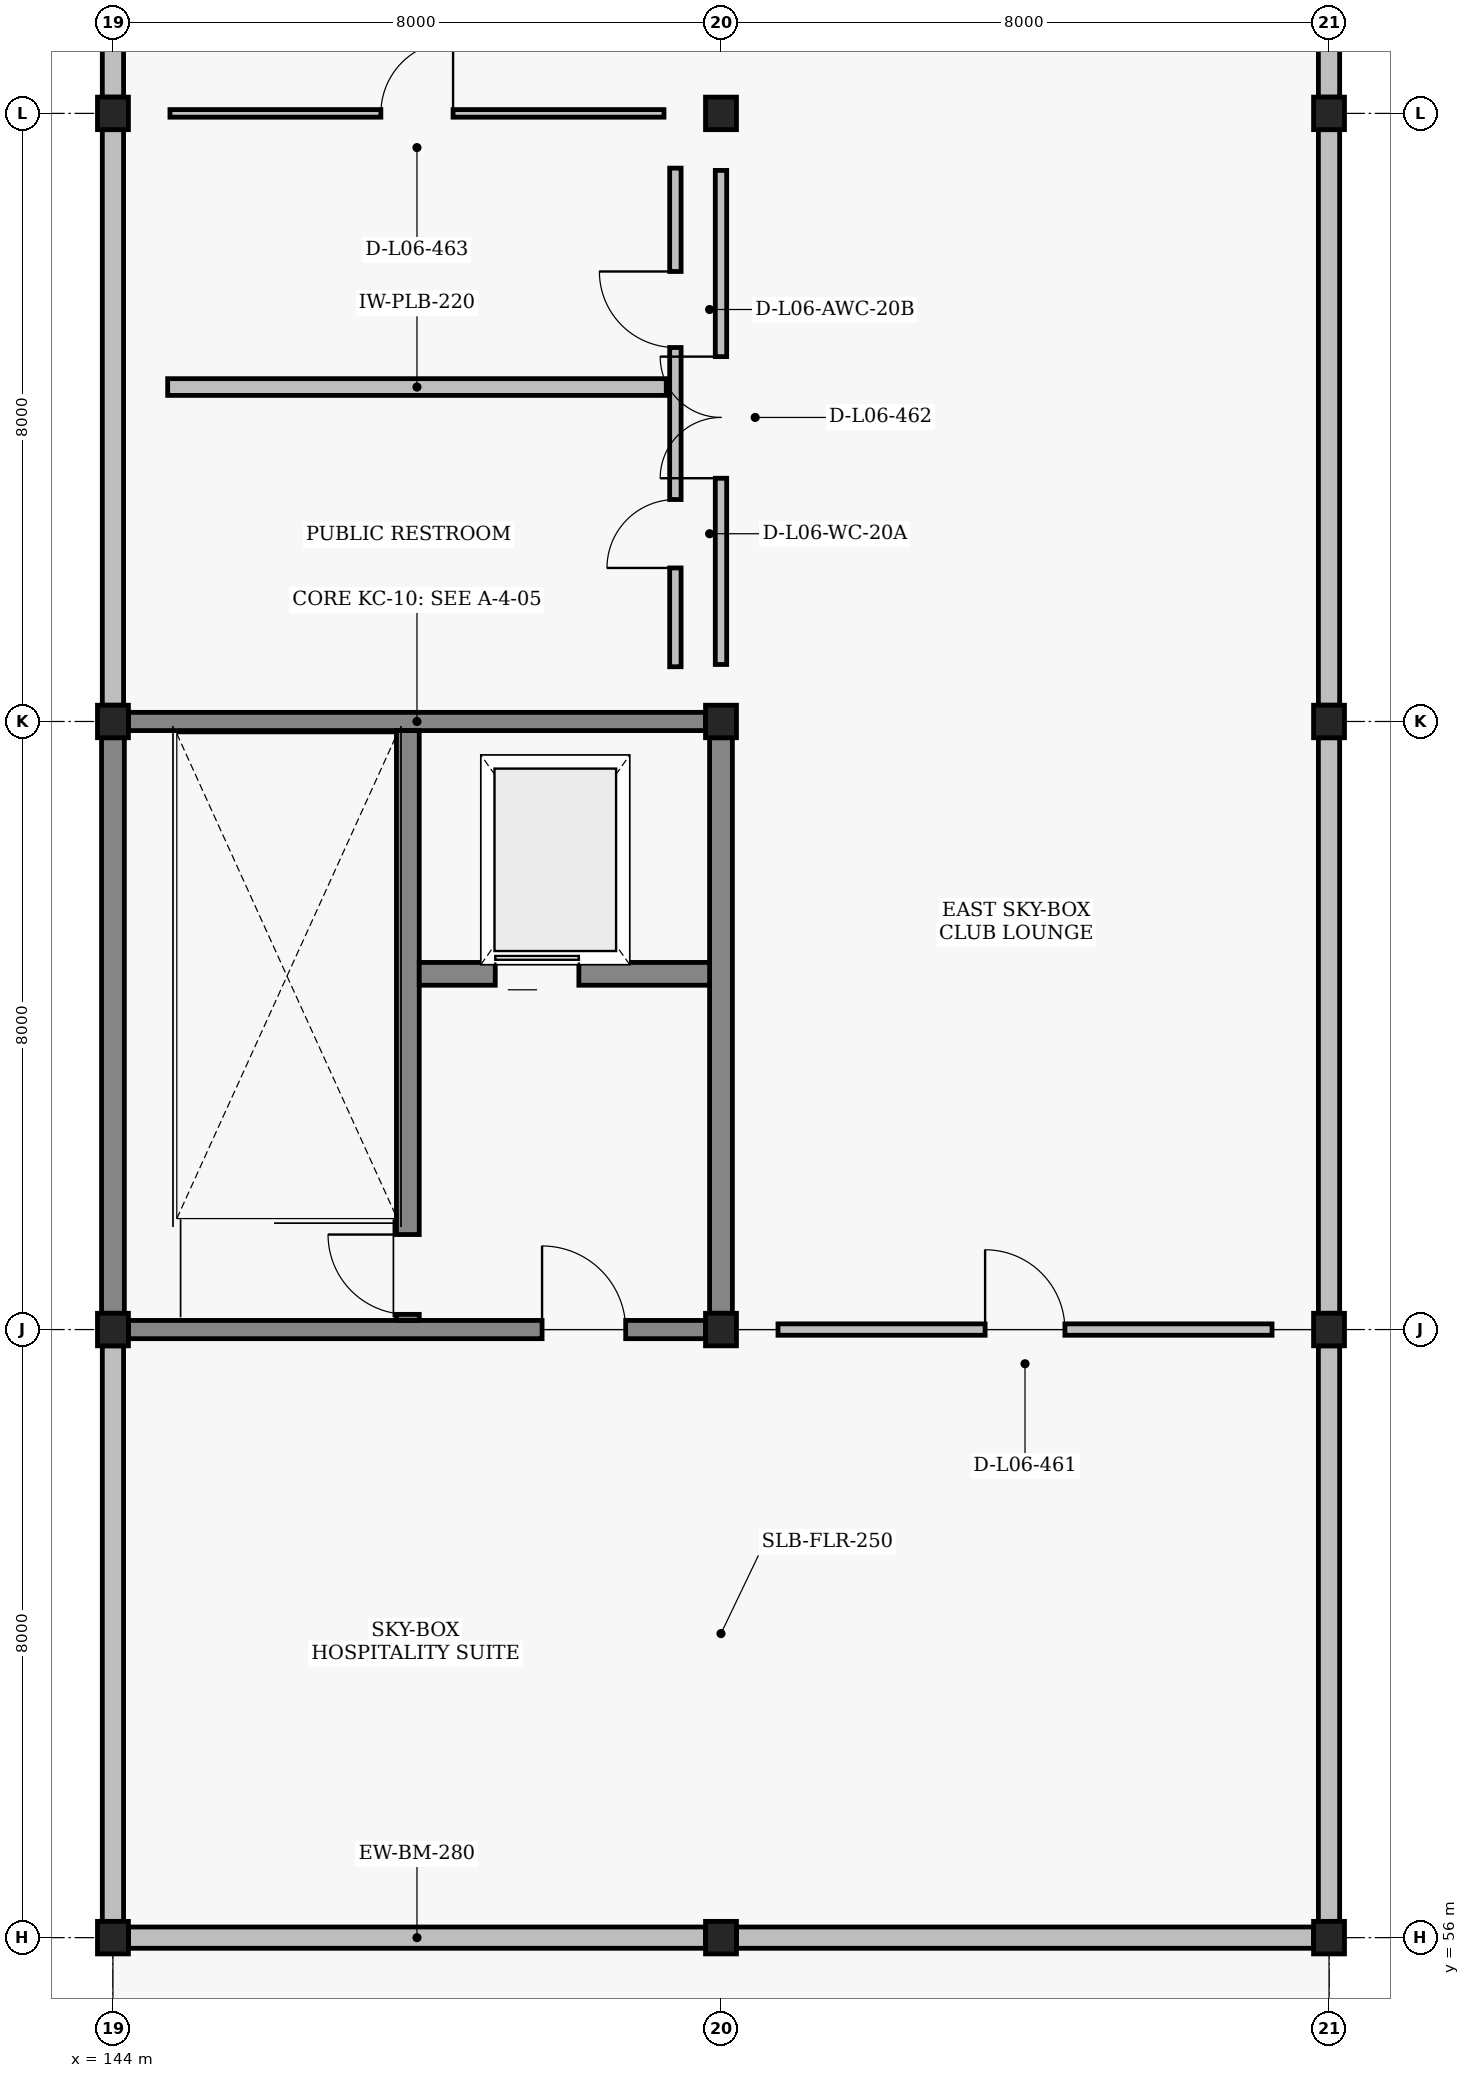
"""IFC4 building model, lengths in metres.
Left out: names, types, materials, properties, quantities, classifications, styles, units other than length and angle.
Written with IfcOpenShell. Run it as: python <this file> out.ifc"""

import sys

from ifc_helpers import new_model, si_unit, direction, frame, frame_2d, origin, origin_2d, place, context, subcontext, project, spatial, rectangle, i_section, extrude, element, fill, save


model = new_model("IFC4")
c1 = context("Model", 3, precision=1e-05, world=origin(), true_north=direction((0.0, 1.0)))
c2 = subcontext(c1, "Body", "Model", "MODEL_VIEW")
j1 = project(units=[si_unit("LENGTHUNIT", "METRE"), si_unit("PLANEANGLEUNIT", "RADIAN")], contexts=[c1])
p1 = place(None, origin())
s1 = spatial("IfcSite", under=j1, at=p1, CompositionType="ELEMENT")
p2 = place(p1, origin())
s2 = spatial("IfcBuilding", under=s1, at=p2, CompositionType="ELEMENT")
p3 = place(p2, frame((0.0, 0.0, 22.8)))
s3 = spatial("IfcBuildingStorey", under=s2, at=p3, CompositionType="ELEMENT", Elevation=22.8)
for number, where, z_axis, x_axis in (
    (1, (144.0, 56.0, 0.0), (0.0, 0.0, 1.0), (1.0, 0.0, 0.0)),
    (2, (144.0, 64.0, 0.0), (0.0, 0.0, 1.0), (1.0, 0.0, 0.0)),
    (3, (144.0, 72.0, 0.0), (0.0, 0.0, 1.0), (1.0, 0.0, 0.0)),
    (4, (144.0, 80.0, 0.0), (0.0, 0.0, 1.0), (1.0, 0.0, 0.0)),
    (5, (152.0, 56.0, 0.0), (0.0, 0.0, 1.0), (1.0, 0.0, 0.0)),
    (6, (152.0, 64.0, 0.0), (0.0, 0.0, 1.0), (1.0, 0.0, 0.0)),
    (7, (152.0, 72.0, 0.0), (0.0, 0.0, 1.0), (1.0, 0.0, 0.0)),
    (8, (152.0, 80.0, 0.0), (0.0, 0.0, 1.0), (1.0, 0.0, 0.0)),
    (9, (160.0, 56.0, 0.0), (0.0, 0.0, 1.0), (1.0, 0.0, 0.0)),
    (10, (160.0, 64.0, 0.0), (0.0, 0.0, 1.0), (1.0, 0.0, 0.0)),
    (11, (160.0, 72.0, 0.0), (0.0, 0.0, 1.0), (1.0, 0.0, 0.0)),
    (12, (160.0, 80.0, 0.0), (0.0, 0.0, 1.0), (1.0, 0.0, 0.0)),
):
    element("IfcColumn", number, at=place(p3, frame(where, z_axis=z_axis, x_axis=x_axis)), inside=s3, PredefinedType="COLUMN", context=c2, shape_type="SweptSolid", body=[
        extrude(i_section(OverallWidth=0.407, OverallDepth=0.428, WebThickness=0.02, FlangeThickness=0.035, at=origin_2d()), origin(), (0.0, 0.0, 1.0), 4.2),
    ])
p4 = place(p3, frame((144.204, 56.0, 0.0), z_axis=(0.0, 0.0, 1.0), x_axis=(1.0, 0.0, 0.0)))
e13 = element("IfcWall", 13, at=p4, inside=s3, PredefinedType="SOLIDWALL", context=c2, shape_type="SweptSolid", body=[
    extrude(rectangle(XDim=7.592, YDim=0.28, at=frame_2d((3.796, 0.0))), origin(), (0.0, 0.0, 1.0), 3.35),
])
for number, where, z_axis, x_axis in (
    (14, (144.0, 56.214, 0.0), (0.0, 0.0, 1.0), (0.0, 1.0, 0.0)),
    (15, (144.0, 72.214, 0.0), (0.0, 0.0, 1.0), (0.0, 1.0, 0.0)),
    (16, (144.0, 80.214, 0.0), (0.0, 0.0, 1.0), (0.0, 1.0, 0.0)),
):
    element("IfcWall", number, at=place(p3, frame(where, z_axis=z_axis, x_axis=x_axis)), inside=s3, PredefinedType="SOLIDWALL", context=c2, shape_type="SweptSolid", body=[
        extrude(rectangle(XDim=7.572, YDim=0.28, at=frame_2d((3.786, 0.0))), origin(), (0.0, 0.0, 1.0), 3.35),
    ])
p5 = place(p3, frame((152.204, 56.0, 0.0), z_axis=(0.0, 0.0, 1.0), x_axis=(1.0, 0.0, 0.0)))
e17 = element("IfcWall", 17, at=p5, inside=s3, PredefinedType="SOLIDWALL", context=c2, shape_type="SweptSolid", body=[
    extrude(rectangle(XDim=7.592, YDim=0.28, at=frame_2d((3.796, 0.0))), origin(), (0.0, 0.0, 1.0), 3.35),
])
for number, where, z_axis, x_axis in (
    (18, (160.0, 56.214, 0.0), (0.0, 0.0, 1.0), (0.0, 1.0, 0.0)),
    (19, (160.0, 64.214, 0.0), (0.0, 0.0, 1.0), (0.0, 1.0, 0.0)),
    (20, (160.0, 72.214, 0.0), (0.0, 0.0, 1.0), (0.0, 1.0, 0.0)),
    (21, (160.0, 80.214, 0.0), (0.0, 0.0, 1.0), (0.0, 1.0, 0.0)),
):
    element("IfcWall", number, at=place(p3, frame(where, z_axis=z_axis, x_axis=x_axis)), inside=s3, PredefinedType="SOLIDWALL", context=c2, shape_type="SweptSolid", body=[
        extrude(rectangle(XDim=7.572, YDim=0.28, at=frame_2d((3.786, 0.0))), origin(), (0.0, 0.0, 1.0), 3.35),
    ])
p6 = place(p3, frame((144.204, 64.0, 0.0), z_axis=(0.0, 0.0, 1.0), x_axis=(1.0, 0.0, 0.0)))
e22 = element("IfcWall", 22, at=p6, inside=s3, PredefinedType="SHEAR", context=c2, shape_type="SweptSolid", body=[
    extrude(rectangle(XDim=7.592, YDim=0.24, at=frame_2d((3.796, 0.0))), origin(), (0.0, 0.0, 1.0), 3.37),
])
p7 = place(p6, frame((5.442, 0.0, 0.0)))
e23 = element("IfcOpeningElement", 23, at=p7, cuts=e22, PredefinedType="OPENING", context=c2, shape_type="SweptSolid", body=[
    extrude(rectangle(XDim=1.1, YDim=2.2, at=frame_2d((0.55, 1.1))), frame((0.0, 0.13, 0.0), z_axis=(0.0, -1.0, 0.0), x_axis=(1.0, 0.0, 0.0)), (0.0, 0.0, 1.0), 0.26),
])
p8 = place(p3, frame((144.204, 72.0, 0.0), z_axis=(0.0, 0.0, 1.0), x_axis=(1.0, 0.0, 0.0)))
e24 = element("IfcWall", 24, at=p8, inside=s3, PredefinedType="SHEAR", context=c2, shape_type="SweptSolid", body=[
    extrude(rectangle(XDim=7.592, YDim=0.24, at=frame_2d((3.796, 0.0))), origin(), (0.0, 0.0, 1.0), 3.37),
])
for number, where, z_axis, x_axis in (
    (25, (144.0, 64.214, 0.0), (0.0, 0.0, 1.0), (0.0, 1.0, 0.0)),
    (26, (152.0, 64.214, 0.0), (0.0, 0.0, 1.0), (0.0, 1.0, 0.0)),
):
    element("IfcWall", number, at=place(p3, frame(where, z_axis=z_axis, x_axis=x_axis)), inside=s3, PredefinedType="SHEAR", context=c2, shape_type="SweptSolid", body=[
        extrude(rectangle(XDim=7.572, YDim=0.3, at=frame_2d((3.786, 0.0))), origin(), (0.0, 0.0, 1.0), 3.37),
    ])
p9 = place(p3, frame((147.88, 64.12, 0.0), z_axis=(0.0, 0.0, 1.0), x_axis=(0.0, 1.0, 0.0)))
e27 = element("IfcWall", 27, at=p9, inside=s3, PredefinedType="SHEAR", context=c2, shape_type="SweptSolid", body=[
    extrude(rectangle(XDim=7.76, YDim=0.3, at=frame_2d((3.88, 0.0))), origin(), (0.0, 0.0, 1.0), 3.47),
])
p10 = place(p9, frame((0.08, 0.0, 0.0)))
e28 = element("IfcOpeningElement", 28, at=p10, cuts=e27, PredefinedType="OPENING", context=c2, shape_type="SweptSolid", body=[
    extrude(rectangle(XDim=1.05, YDim=2.15, at=frame_2d((0.525, 1.075))), frame((0.0, 0.16, 0.0), z_axis=(0.0, -1.0, 0.0), x_axis=(1.0, 0.0, 0.0)), (0.0, 0.0, 1.0), 0.32),
])
p11 = place(p3, frame((148.03, 68.68, 0.0), z_axis=(0.0, 0.0, 1.0), x_axis=(1.0, 0.0, 0.0)))
e29 = element("IfcWall", 29, at=p11, inside=s3, PredefinedType="SHEAR", context=c2, shape_type="SweptSolid", body=[
    extrude(rectangle(XDim=3.82, YDim=0.3, at=frame_2d((1.91, 0.0))), origin(), (0.0, 0.0, 1.0), 3.37),
])
p12 = place(p11, frame((1.0, 0.0, 0.0)))
e30 = element("IfcOpeningElement", 30, at=p12, cuts=e29, PredefinedType="OPENING", context=c2, shape_type="SweptSolid", body=[
    extrude(rectangle(XDim=1.1, YDim=2.15, at=frame_2d((0.55, 1.075))), frame((0.0, 0.16, 0.0), z_axis=(0.0, -1.0, 0.0), x_axis=(1.0, 0.0, 0.0)), (0.0, 0.0, 1.0), 0.32),
])
p13 = place(p3, frame((144.72, 76.4, 0.0), z_axis=(0.0, 0.0, 1.0), x_axis=(1.0, 0.0, 0.0)))
e31 = element("IfcWall", 31, at=p13, inside=s3, PredefinedType="PLUMBINGWALL", context=c2, shape_type="SweptSolid", body=[
    extrude(rectangle(XDim=6.56, YDim=0.22, at=frame_2d((3.28, 0.0))), origin(), (0.0, 0.0, 1.0), 3.67),
])
p14 = place(p3, frame((151.4, 72.72, 0.0), z_axis=(0.0, 0.0, 1.0), x_axis=(0.0, 1.0, 0.0)))
e32 = element("IfcWall", 32, at=p14, inside=s3, PredefinedType="PARTITIONING", context=c2, shape_type="SweptSolid", body=[
    extrude(rectangle(XDim=6.56, YDim=0.15, at=frame_2d((3.28, 0.0))), origin(), (0.0, 0.0, 1.0), 3.67),
])
p15 = place(p14, frame((1.3, 0.0, 0.0)))
e33 = element("IfcOpeningElement", 33, at=p15, cuts=e32, PredefinedType="OPENING", context=c2, shape_type="SweptSolid", body=[
    extrude(rectangle(XDim=0.9, YDim=2.1, at=frame_2d((0.45, 1.05))), frame((0.0, 0.085, 0.0), z_axis=(0.0, -1.0, 0.0), x_axis=(1.0, 0.0, 0.0)), (0.0, 0.0, 1.0), 0.17),
])
p16 = place(p14, frame((4.2, 0.0, 0.0)))
e34 = element("IfcOpeningElement", 34, at=p16, cuts=e32, PredefinedType="OPENING", context=c2, shape_type="SweptSolid", body=[
    extrude(rectangle(XDim=1.0, YDim=2.15, at=frame_2d((0.5, 1.075))), frame((0.0, 0.085, 0.0), z_axis=(0.0, -1.0, 0.0), x_axis=(1.0, 0.0, 0.0)), (0.0, 0.0, 1.0), 0.17),
])
p17 = place(p3, frame((152.75, 64.0, 0.0), z_axis=(0.0, 0.0, 1.0), x_axis=(1.0, 0.0, 0.0)))
e35 = element("IfcWall", 35, at=p17, inside=s3, PredefinedType="PARTITIONING", context=c2, shape_type="SweptSolid", body=[
    extrude(rectangle(XDim=6.5, YDim=0.15, at=frame_2d((3.25, 0.0))), origin(), (0.0, 0.0, 1.0), 3.47),
])
p18 = place(p17, frame((2.725, 0.0, 0.0)))
e36 = element("IfcOpeningElement", 36, at=p18, cuts=e35, PredefinedType="OPENING", context=c2, shape_type="SweptSolid", body=[
    extrude(rectangle(XDim=1.05, YDim=2.15, at=frame_2d((0.525, 1.075))), frame((0.0, 0.085, 0.0), z_axis=(0.0, -1.0, 0.0), x_axis=(1.0, 0.0, 0.0)), (0.0, 0.0, 1.0), 0.17),
])
p19 = place(p3, frame((152.0, 72.75, 0.0), z_axis=(0.0, 0.0, 1.0), x_axis=(0.0, 1.0, 0.0)))
e37 = element("IfcWall", 37, at=p19, inside=s3, PredefinedType="PARTITIONING", context=c2, shape_type="SweptSolid", body=[
    extrude(rectangle(XDim=6.5, YDim=0.15, at=frame_2d((3.25, 0.0))), origin(), (0.0, 0.0, 1.0), 3.37),
])
p20 = place(p19, frame((2.45, 0.0, 0.0)))
e38 = element("IfcOpeningElement", 38, at=p20, cuts=e37, PredefinedType="OPENING", context=c2, shape_type="SweptSolid", body=[
    extrude(rectangle(XDim=1.6, YDim=2.2, at=frame_2d((0.8, 1.1))), frame((0.0, 0.085, 0.0), z_axis=(0.0, -1.0, 0.0), x_axis=(1.0, 0.0, 0.0)), (0.0, 0.0, 1.0), 0.17),
])
p21 = place(p3, frame((144.75, 80.0, 0.0), z_axis=(0.0, 0.0, 1.0), x_axis=(1.0, 0.0, 0.0)))
e39 = element("IfcWall", 39, at=p21, inside=s3, PredefinedType="PARTITIONING", context=c2, shape_type="SweptSolid", body=[
    extrude(rectangle(XDim=6.5, YDim=0.1, at=frame_2d((3.25, 0.0))), origin(), (0.0, 0.0, 1.0), 3.47),
])
p22 = place(p21, frame((2.775, 0.0, 0.0)))
e40 = element("IfcOpeningElement", 40, at=p22, cuts=e39, PredefinedType="OPENING", context=c2, shape_type="SweptSolid", body=[
    extrude(rectangle(XDim=0.95, YDim=2.1, at=frame_2d((0.475, 1.05))), frame((0.0, 0.06, 0.0), z_axis=(0.0, -1.0, 0.0), x_axis=(1.0, 0.0, 0.0)), (0.0, 0.0, 1.0), 0.12),
])
p23 = place(p7, origin())
e41 = element("IfcDoor", 41, at=p23, inside=s3, OperationType="SINGLE_SWING_LEFT", PredefinedType="DOOR", context=c2, shape_type="SweptSolid", body=[
    extrude(rectangle(XDim=1.1, YDim=2.2, at=frame_2d((0.55, 1.1))), frame((0.0, 0.025, 0.0), z_axis=(0.0, -1.0, 0.0), x_axis=(1.0, 0.0, 0.0)), (0.0, 0.0, 1.0), 0.05),
])
fill(e23, e41)
p24 = place(p10, origin())
e42 = element("IfcDoor", 42, at=p24, inside=s3, OperationType="SINGLE_SWING_RIGHT", PredefinedType="DOOR", context=c2, shape_type="SweptSolid", body=[
    extrude(rectangle(XDim=1.05, YDim=2.15, at=frame_2d((0.525, 1.075))), frame((0.0, 0.025, 0.0), z_axis=(0.0, -1.0, 0.0), x_axis=(1.0, 0.0, 0.0)), (0.0, 0.0, 1.0), 0.05),
])
fill(e28, e42)
p25 = place(p12, origin())
e43 = element("IfcDoor", 43, at=p25, inside=s3, OperationType="SLIDING_TO_LEFT", PredefinedType="DOOR", context=c2, shape_type="SweptSolid", body=[
    extrude(rectangle(XDim=1.1, YDim=2.15, at=frame_2d((0.55, 1.075))), frame((0.0, 0.025, 0.0), z_axis=(0.0, -1.0, 0.0), x_axis=(1.0, 0.0, 0.0)), (0.0, 0.0, 1.0), 0.05),
])
fill(e30, e43)
p26 = place(p15, origin())
e44 = element("IfcDoor", 44, at=p26, inside=s3, OperationType="SINGLE_SWING_LEFT", PredefinedType="DOOR", context=c2, shape_type="SweptSolid", body=[
    extrude(rectangle(XDim=0.9, YDim=2.1, at=frame_2d((0.45, 1.05))), frame((0.0, 0.025, 0.0), z_axis=(0.0, -1.0, 0.0), x_axis=(1.0, 0.0, 0.0)), (0.0, 0.0, 1.0), 0.05),
])
fill(e33, e44)
p27 = place(p16, origin())
e45 = element("IfcDoor", 45, at=p27, inside=s3, OperationType="SINGLE_SWING_RIGHT", PredefinedType="DOOR", context=c2, shape_type="SweptSolid", body=[
    extrude(rectangle(XDim=1.0, YDim=2.15, at=frame_2d((0.5, 1.075))), frame((0.0, 0.025, 0.0), z_axis=(0.0, -1.0, 0.0), x_axis=(1.0, 0.0, 0.0)), (0.0, 0.0, 1.0), 0.05),
])
fill(e34, e45)
p28 = place(p18, origin())
e46 = element("IfcDoor", 46, at=p28, inside=s3, OperationType="SINGLE_SWING_LEFT", PredefinedType="DOOR", context=c2, shape_type="SweptSolid", body=[
    extrude(rectangle(XDim=1.05, YDim=2.15, at=frame_2d((0.525, 1.075))), frame((0.0, 0.025, 0.0), z_axis=(0.0, -1.0, 0.0), x_axis=(1.0, 0.0, 0.0)), (0.0, 0.0, 1.0), 0.05),
])
fill(e36, e46)
p29 = place(p20, origin())
e47 = element("IfcDoor", 47, at=p29, inside=s3, OperationType="DOUBLE_SWING_LEFT", PredefinedType="DOOR", context=c2, shape_type="SweptSolid", body=[
    extrude(rectangle(XDim=1.6, YDim=2.2, at=frame_2d((0.8, 1.1))), frame((0.0, 0.025, 0.0), z_axis=(0.0, -1.0, 0.0), x_axis=(1.0, 0.0, 0.0)), (0.0, 0.0, 1.0), 0.05),
])
fill(e38, e47)
p30 = place(p22, origin())
e48 = element("IfcDoor", 48, at=p30, inside=s3, OperationType="SINGLE_SWING_RIGHT", PredefinedType="DOOR", context=c2, shape_type="SweptSolid", body=[
    extrude(rectangle(XDim=0.95, YDim=2.1, at=frame_2d((0.475, 1.05))), frame((0.0, 0.025, 0.0), z_axis=(0.0, -1.0, 0.0), x_axis=(1.0, 0.0, 0.0)), (0.0, 0.0, 1.0), 0.05),
])
fill(e40, e48)
save(model, sys.argv[1])
